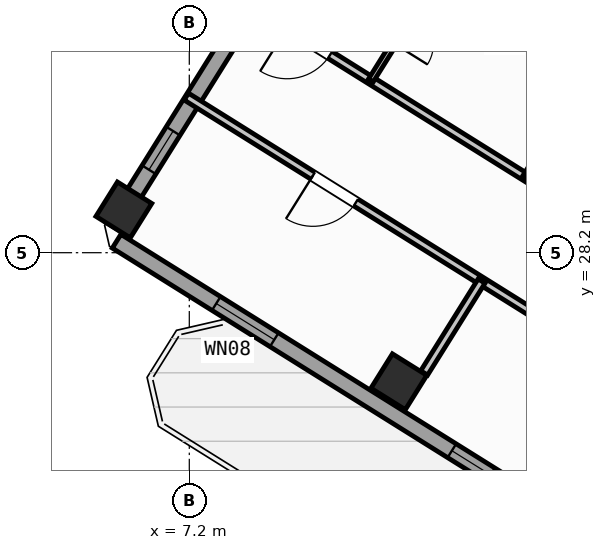
"""IFC4 building model, lengths in metres.
Left out: names, types, materials, properties, quantities, classifications, styles, units other than length and angle.
Written with IfcOpenShell. Run it as: python <this file> out.ifc"""

import sys

from ifc_helpers import new_model, si_unit, direction, frame, frame_2d, origin, origin_2d, place, context, subcontext, project, spatial, rectangle, hollow_rectangle, extrude, source, transform, mapped, element, fill, save


model = new_model("IFC4")
c1 = context("Model", 3, precision=1e-05, world=origin(), true_north=direction((0.0, 1.0)))
c2 = subcontext(c1, "Body", "Model", "MODEL_VIEW")
j1 = project(units=[si_unit("LENGTHUNIT", "METRE"), si_unit("PLANEANGLEUNIT", "RADIAN")], contexts=[c1])
p1 = place(None, origin())
s1 = spatial("IfcSite", under=j1, at=p1, CompositionType="ELEMENT")
p2 = place(p1, origin())
s2 = spatial("IfcBuilding", under=s1, at=p2, CompositionType="ELEMENT")
p3 = place(p2, frame((0.0, 0.0, 225.6)))
s3 = spatial("IfcBuildingStorey", under=s2, at=p3, CompositionType="ELEMENT", Elevation=225.6)
m1 = source(origin(), c2, "Body", "SweptSolid", [
    extrude(hollow_rectangle(XDim=0.8, YDim=0.8, WallThickness=0.032, at=origin_2d()), origin(), (0.0, 0.0, 1.0), 3.6),
])
for number, where, z_axis, x_axis in (
    (1, (11.336, 25.653, 0.0), (0.0, 0.0, 1.0), (-0.848, 0.53, 0.0)),
    (2, (5.909, 29.044, 0.0), (0.0, 0.0, 1.0), (-0.848, 0.53, 0.0)),
):
    element("IfcColumn", number, at=place(p3, frame(where, z_axis=z_axis, x_axis=x_axis)), inside=s3, PredefinedType="COLUMN", context=c2, shape_type="MappedRepresentation", body=[
        mapped(m1, transform((0.0, 0.0, 0.0), scale=1.0)),
    ])
p4 = place(p3, frame((31.76, 12.183, 0.0), z_axis=(0.0, 0.0, 1.0), x_axis=(-0.848047074256, 0.529920899612, 0.0)))
e3 = element("IfcWall", 3, at=p4, inside=s3, PredefinedType="STANDARD", context=c2, shape_type="SweptSolid", body=[
    extrude(rectangle(XDim=30.652, YDim=0.32, at=frame_2d((15.326, 0.0))), origin(), (0.0, 0.0, 1.0), 3.35),
])
p5 = place(p4, frame((15.166, 0.0, 0.0)))
e4 = element("IfcOpeningElement", 4, at=p5, cuts=e3, PredefinedType="OPENING", context=c2, shape_type="SweptSolid", body=[
    extrude(rectangle(XDim=1.2, YDim=2.15, at=frame_2d((0.6, 1.075))), frame((0.0, 0.17, 0.0), z_axis=(0.0, -1.0, 0.0), x_axis=(1.0, 0.0, 0.0)), (0.0, 0.0, 1.0), 0.34),
])
p6 = place(p4, frame((2.24, 0.0, 0.9)))
e5 = element("IfcOpeningElement", 5, at=p6, cuts=e3, PredefinedType="OPENING", context=c2, shape_type="SweptSolid", body=[
    extrude(rectangle(XDim=1.65, YDim=1.45, at=frame_2d((0.825, 0.725))), frame((0.0, 0.17, 0.0), z_axis=(0.0, -1.0, 0.0), x_axis=(1.0, 0.0, 0.0)), (0.0, 0.0, 1.0), 0.34),
])
p7 = place(p4, frame((7.469, 0.0, 0.9)))
e6 = element("IfcOpeningElement", 6, at=p7, cuts=e3, PredefinedType="OPENING", context=c2, shape_type="SweptSolid", body=[
    extrude(rectangle(XDim=1.65, YDim=1.45, at=frame_2d((0.825, 0.725))), frame((0.0, 0.17, 0.0), z_axis=(0.0, -1.0, 0.0), x_axis=(1.0, 0.0, 0.0)), (0.0, 0.0, 1.0), 0.34),
])
p8 = place(p4, frame((12.623, 0.0, 1.0)))
e7 = element("IfcOpeningElement", 7, at=p8, cuts=e3, PredefinedType="OPENING", context=c2, shape_type="SweptSolid", body=[
    extrude(rectangle(XDim=0.9, YDim=1.25, at=frame_2d((0.45, 0.625))), frame((0.0, 0.17, 0.0), z_axis=(0.0, -1.0, 0.0), x_axis=(1.0, 0.0, 0.0)), (0.0, 0.0, 1.0), 0.34),
])
p9 = place(p4, frame((19.556, 0.0, 1.0)))
e8 = element("IfcOpeningElement", 8, at=p9, cuts=e3, PredefinedType="OPENING", context=c2, shape_type="SweptSolid", body=[
    extrude(rectangle(XDim=0.9, YDim=1.25, at=frame_2d((0.45, 0.625))), frame((0.0, 0.17, 0.0), z_axis=(0.0, -1.0, 0.0), x_axis=(1.0, 0.0, 0.0)), (0.0, 0.0, 1.0), 0.34),
])
p10 = place(p4, frame((21.95, 0.0, 1.0)))
e9 = element("IfcOpeningElement", 9, at=p10, cuts=e3, PredefinedType="OPENING", context=c2, shape_type="SweptSolid", body=[
    extrude(rectangle(XDim=0.9, YDim=1.25, at=frame_2d((0.45, 0.625))), frame((0.0, 0.17, 0.0), z_axis=(0.0, -1.0, 0.0), x_axis=(1.0, 0.0, 0.0)), (0.0, 0.0, 1.0), 0.34),
])
p11 = place(p4, frame((26.983, 0.0, 0.9)))
e10 = element("IfcOpeningElement", 10, at=p11, cuts=e3, PredefinedType="OPENING", context=c2, shape_type="SweptSolid", body=[
    extrude(rectangle(XDim=1.35, YDim=1.45, at=frame_2d((0.675, 0.725))), frame((0.0, 0.17, 0.0), z_axis=(0.0, -1.0, 0.0), x_axis=(1.0, 0.0, 0.0)), (0.0, 0.0, 1.0), 0.34),
])
p12 = place(p3, frame((5.7, 28.71, 0.0), z_axis=(0.0, 0.0, 1.0), x_axis=(0.529923711467, 0.8480453172, 0.0)))
e11 = element("IfcWall", 11, at=p12, inside=s3, PredefinedType="STANDARD", context=c2, shape_type="SweptSolid", body=[
    extrude(rectangle(XDim=21.587, YDim=0.32, at=frame_2d((10.794, 0.0))), origin(), (0.0, 0.0, 1.0), 2.825),
])
p13 = place(p12, frame((1.329, 0.0, 1.0)))
e12 = element("IfcOpeningElement", 12, at=p13, cuts=e11, PredefinedType="OPENING", context=c2, shape_type="SweptSolid", body=[
    extrude(rectangle(XDim=0.9, YDim=1.25, at=frame_2d((0.45, 0.625))), frame((0.0, 0.17, 0.0), z_axis=(0.0, -1.0, 0.0), x_axis=(1.0, 0.0, 0.0)), (0.0, 0.0, 1.0), 0.34),
])
p14 = place(p12, frame((5.859, 0.0, 1.0)))
e13 = element("IfcOpeningElement", 13, at=p14, cuts=e11, PredefinedType="OPENING", context=c2, shape_type="SweptSolid", body=[
    extrude(rectangle(XDim=0.9, YDim=1.25, at=frame_2d((0.45, 0.625))), frame((0.0, 0.17, 0.0), z_axis=(0.0, -1.0, 0.0), x_axis=(1.0, 0.0, 0.0)), (0.0, 0.0, 1.0), 0.34),
])
p15 = place(p12, frame((10.369, 0.0, 0.95)))
e14 = element("IfcOpeningElement", 14, at=p15, cuts=e11, PredefinedType="OPENING", context=c2, shape_type="SweptSolid", body=[
    extrude(rectangle(XDim=1.95, YDim=1.35, at=frame_2d((0.975, 0.675))), frame((0.0, 0.17, 0.0), z_axis=(0.0, -1.0, 0.0), x_axis=(1.0, 0.0, 0.0)), (0.0, 0.0, 1.0), 0.34),
])
p16 = place(p12, frame((16.5, 0.0, 1.0)))
e15 = element("IfcOpeningElement", 15, at=p16, cuts=e11, PredefinedType="OPENING", context=c2, shape_type="SweptSolid", body=[
    extrude(rectangle(XDim=0.9, YDim=1.25, at=frame_2d((0.45, 0.625))), frame((0.0, 0.17, 0.0), z_axis=(0.0, -1.0, 0.0), x_axis=(1.0, 0.0, 0.0)), (0.0, 0.0, 1.0), 0.34),
])
p17 = place(p12, frame((18.913, 0.0, 1.0)))
e16 = element("IfcOpeningElement", 16, at=p17, cuts=e11, PredefinedType="OPENING", context=c2, shape_type="SweptSolid", body=[
    extrude(rectangle(XDim=0.9, YDim=1.25, at=frame_2d((0.45, 0.625))), frame((0.0, 0.17, 0.0), z_axis=(0.0, -1.0, 0.0), x_axis=(1.0, 0.0, 0.0)), (0.0, 0.0, 1.0), 0.34),
])
p18 = place(p3, frame((22.495, 24.281, 0.0), z_axis=(0.0, 0.0, 1.0), x_axis=(-0.848052408131, 0.529912363569, 0.0)))
e17 = element("IfcWall", 17, at=p18, inside=s3, PredefinedType="PARTITIONING", context=c2, shape_type="SweptSolid", body=[
    extrude(rectangle(XDim=16.73, YDim=0.16, at=frame_2d((8.365, 0.0))), origin(), (0.0, 0.0, 1.0), 3.34),
])
p19 = place(p18, frame((1.385, 0.0, 0.0)))
e18 = element("IfcOpeningElement", 18, at=p19, cuts=e17, PredefinedType="OPENING", context=c2, shape_type="SweptSolid", body=[
    extrude(rectangle(XDim=1.0, YDim=2.1, at=frame_2d((0.5, 1.05))), frame((0.0, 0.09, 0.0), z_axis=(0.0, -1.0, 0.0), x_axis=(1.0, 0.0, 0.0)), (0.0, 0.0, 1.0), 0.18),
])
p20 = place(p18, frame((14.76, 0.0, 0.0)))
e19 = element("IfcOpeningElement", 19, at=p20, cuts=e17, PredefinedType="OPENING", context=c2, shape_type="SweptSolid", body=[
    extrude(rectangle(XDim=1.0, YDim=2.1, at=frame_2d((0.5, 1.05))), frame((0.0, 0.09, 0.0), z_axis=(0.0, -1.0, 0.0), x_axis=(1.0, 0.0, 0.0)), (0.0, 0.0, 1.0), 0.18),
])
p21 = place(p3, frame((21.329, 22.416, 0.0), z_axis=(0.0, 0.0, 1.0), x_axis=(-0.848052408131, 0.529912363569, 0.0)))
e20 = element("IfcWall", 20, at=p21, inside=s3, PredefinedType="PARTITIONING", context=c2, shape_type="SweptSolid", body=[
    extrude(rectangle(XDim=16.73, YDim=0.16, at=frame_2d((8.365, 0.0))), origin(), (0.0, 0.0, 1.0), 3.34),
])
p22 = place(p21, frame((1.505, 0.0, 0.0)))
e21 = element("IfcOpeningElement", 21, at=p22, cuts=e20, PredefinedType="OPENING", context=c2, shape_type="SweptSolid", body=[
    extrude(rectangle(XDim=1.0, YDim=2.1, at=frame_2d((0.5, 1.05))), frame((0.0, 0.09, 0.0), z_axis=(0.0, -1.0, 0.0), x_axis=(1.0, 0.0, 0.0)), (0.0, 0.0, 1.0), 0.18),
])
p23 = place(p21, frame((6.435, 0.0, 0.0)))
e22 = element("IfcOpeningElement", 22, at=p23, cuts=e20, PredefinedType="OPENING", context=c2, shape_type="SweptSolid", body=[
    extrude(rectangle(XDim=1.0, YDim=2.1, at=frame_2d((0.5, 1.05))), frame((0.0, 0.09, 0.0), z_axis=(0.0, -1.0, 0.0), x_axis=(1.0, 0.0, 0.0)), (0.0, 0.0, 1.0), 0.18),
])
p24 = place(p21, frame((12.784, 0.0, 0.0)))
e23 = element("IfcOpeningElement", 23, at=p24, cuts=e20, PredefinedType="OPENING", context=c2, shape_type="SweptSolid", body=[
    extrude(rectangle(XDim=1.0, YDim=2.1, at=frame_2d((0.5, 1.05))), frame((0.0, 0.09, 0.0), z_axis=(0.0, -1.0, 0.0), x_axis=(1.0, 0.0, 0.0)), (0.0, 0.0, 1.0), 0.18),
])
p25 = place(p3, frame((12.968, 27.64, 0.0), z_axis=(0.0, 0.0, 1.0), x_axis=(-0.52989628283, -0.848062456098, 0.0)))
e24 = element("IfcWall", 24, at=p25, inside=s3, PredefinedType="PARTITIONING", context=c2, shape_type="SweptSolid", body=[
    extrude(rectangle(XDim=2.138, YDim=0.16, at=frame_2d((1.069, 0.0))), origin(), (0.0, 0.0, 1.0), 3.34),
])
p26 = place(p3, frame((14.986, 31.494, 0.0), z_axis=(0.0, 0.0, 1.0), x_axis=(-0.52989628283, -0.848062456098, 0.0)))
e25 = element("IfcWall", 25, at=p26, inside=s3, PredefinedType="PARTITIONING", context=c2, shape_type="SweptSolid", body=[
    extrude(rectangle(XDim=2.138, YDim=0.16, at=frame_2d((1.069, 0.0))), origin(), (0.0, 0.0, 1.0), 2.825),
])
p27 = place(p3, frame((19.67, 45.821, 0.0), z_axis=(0.0, 0.0, 1.0), x_axis=(-0.529920421309, -0.848047373134, 0.0)))
e26 = element("IfcWall", 26, at=p27, inside=s3, PredefinedType="PARTITIONING", context=c2, shape_type="SweptSolid", body=[
    extrude(rectangle(XDim=16.77, YDim=0.11, at=frame_2d((8.385, 0.0))), origin(), (0.0, 0.0, 1.0), 3.34),
])
p28 = place(p27, frame((15.13, 0.0, 0.0)))
e27 = element("IfcOpeningElement", 27, at=p28, cuts=e26, PredefinedType="OPENING", context=c2, shape_type="SweptSolid", body=[
    extrude(rectangle(XDim=0.78, YDim=2.05, at=frame_2d((0.39, 1.025))), frame((0.0, 0.065, 0.0), z_axis=(0.0, -1.0, 0.0), x_axis=(1.0, 0.0, 0.0)), (0.0, 0.0, 1.0), 0.13),
])
p29 = place(p27, frame((9.884, 0.0, 0.0)))
e28 = element("IfcOpeningElement", 28, at=p29, cuts=e26, PredefinedType="OPENING", context=c2, shape_type="SweptSolid", body=[
    extrude(rectangle(XDim=0.92, YDim=2.08, at=frame_2d((0.46, 1.04))), frame((0.0, 0.065, 0.0), z_axis=(0.0, -1.0, 0.0), x_axis=(1.0, 0.0, 0.0)), (0.0, 0.0, 1.0), 0.13),
])
p30 = place(p3, frame((14.776, 31.935, 0.0), z_axis=(0.0, 0.0, 1.0), x_axis=(-0.848011130036, 0.529978417802, 0.0)))
e29 = element("IfcWall", 29, at=p30, inside=s3, PredefinedType="PLUMBINGWALL", context=c2, shape_type="SweptSolid", body=[
    extrude(rectangle(XDim=3.208, YDim=0.14, at=frame_2d((1.604, 0.0))), origin(), (0.0, 0.0, 1.0), 2.825),
])
m2 = source(origin(), c2, "Body", "SweptSolid", [
    extrude(rectangle(XDim=0.9, YDim=1.25, at=frame_2d((0.45, 0.625))), frame((0.0, 0.03, 0.0), z_axis=(0.0, -1.0, 0.0), x_axis=(1.0, 0.0, 0.0)), (0.0, 0.0, 1.0), 0.06),
])
p31 = place(p10, origin())
e30 = element("IfcWindow", 30, at=p31, inside=s3, PartitioningType="SINGLE_PANEL", PredefinedType="WINDOW", context=c2, shape_type="MappedRepresentation", body=[
    mapped(m2, transform((0.0, 0.0, 0.0), scale=1.0)),
])
fill(e9, e30)
m3 = source(origin(), c2, "Body", "SweptSolid", [
    extrude(rectangle(XDim=1.35, YDim=1.45, at=frame_2d((0.675, 0.725))), frame((0.0, 0.03, 0.0), z_axis=(0.0, -1.0, 0.0), x_axis=(1.0, 0.0, 0.0)), (0.0, 0.0, 1.0), 0.06),
])
p32 = place(p11, origin())
e31 = element("IfcWindow", 31, at=p32, inside=s3, PartitioningType="SINGLE_PANEL", PredefinedType="WINDOW", context=c2, shape_type="MappedRepresentation", body=[
    mapped(m3, transform((0.0, 0.0, 0.0), scale=1.0)),
])
fill(e10, e31)
p33 = place(p13, origin())
e32 = element("IfcWindow", 32, at=p33, inside=s3, PartitioningType="SINGLE_PANEL", PredefinedType="WINDOW", context=c2, shape_type="MappedRepresentation", body=[
    mapped(m2, transform((0.0, 0.0, 0.0), scale=1.0)),
])
fill(e12, e32)
m4 = source(origin(), c2, "Body", "SweptSolid", [
    extrude(rectangle(XDim=1.0, YDim=2.1, at=frame_2d((0.5, 1.05))), frame((0.0, 0.025, 0.0), z_axis=(0.0, -1.0, 0.0), x_axis=(1.0, 0.0, 0.0)), (0.0, 0.0, 1.0), 0.05),
])
p34 = place(p24, origin())
e33 = element("IfcDoor", 33, at=p34, inside=s3, OperationType="SINGLE_SWING_RIGHT", PredefinedType="DOOR", context=c2, shape_type="MappedRepresentation", body=[
    mapped(m4, transform((0.0, 0.0, 0.0), scale=1.0)),
])
fill(e23, e33)
p35 = place(p20, origin())
e34 = element("IfcDoor", 34, at=p35, inside=s3, OperationType="SINGLE_SWING_RIGHT", PredefinedType="DOOR", context=c2, shape_type="MappedRepresentation", body=[
    mapped(m4, transform((0.0, 0.0, 0.0), scale=1.0)),
])
fill(e19, e34)
save(model, sys.argv[1])
